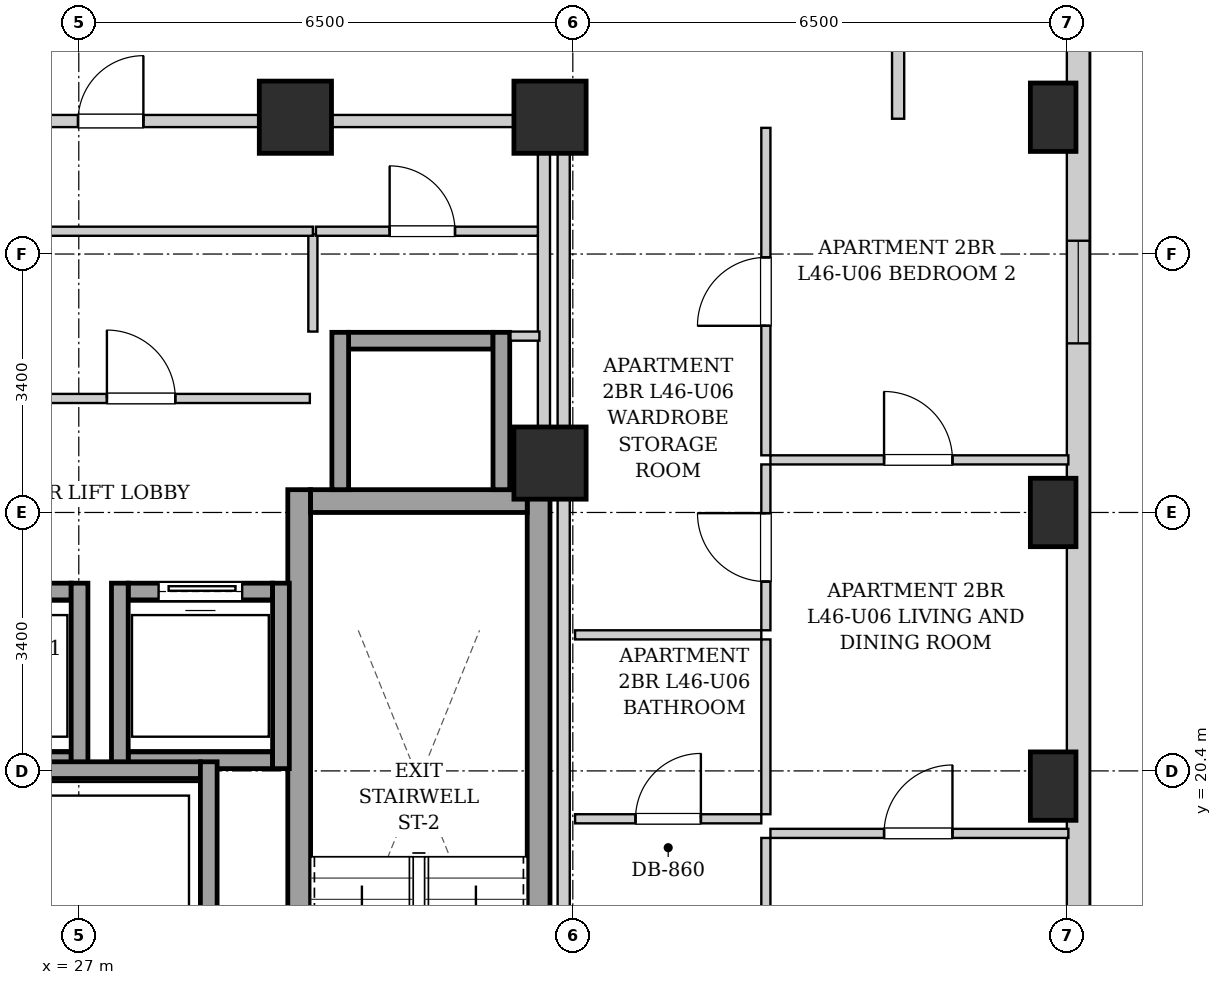
"""IFC4 building model, lengths in metres.
Left out: names, types, materials, properties, quantities, classifications, styles, units other than length and angle.
Written with IfcOpenShell. Run it as: python <this file> out.ifc"""

import sys

from ifc_helpers import new_model, si_unit, direction, frame, frame_2d, origin, origin_2d, place, context, subcontext, project, spatial, rectangle, extrude, element, fill, save


model = new_model("IFC4")
c1 = context("Model", 3, precision=1e-05, world=origin(), true_north=direction((0.0, 1.0)))
c2 = subcontext(c1, "Body", "Model", "MODEL_VIEW")
j1 = project(units=[si_unit("LENGTHUNIT", "METRE"), si_unit("PLANEANGLEUNIT", "RADIAN")], contexts=[c1])
p1 = place(None, origin())
s1 = spatial("IfcSite", under=j1, at=p1, CompositionType="ELEMENT")
p2 = place(p1, origin())
s2 = spatial("IfcBuilding", under=s1, at=p2, CompositionType="ELEMENT")
p3 = place(p2, frame((0.0, 0.0, 160.15)))
s3 = spatial("IfcBuildingStorey", under=s2, at=p3, CompositionType="ELEMENT", Elevation=160.15)
for number, where, z_axis, x_axis in (
    (1, (39.82, 20.2, 0.0), (0.0, 0.0, 1.0), (1.0, 0.0, 0.0)),
    (2, (39.82, 23.8, 0.0), (0.0, 0.0, 1.0), (1.0, 0.0, 0.0)),
    (3, (39.82, 29.0, 0.0), (0.0, 0.0, 1.0), (1.0, 0.0, 0.0)),
):
    element("IfcColumn", number, at=place(p3, frame(where, z_axis=z_axis, x_axis=x_axis)), inside=s3, PredefinedType="COLUMN", context=c2, shape_type="SweptSolid", body=[
        extrude(rectangle(XDim=0.6, YDim=0.9, at=origin_2d()), origin(), (0.0, 0.0, 1.0), 3.25),
    ])
for number, where, z_axis, x_axis in (
    (4, (29.85, 29.0, 0.0), (0.0, 0.0, 1.0), (1.0, 0.0, 0.0)),
    (5, (33.2, 29.0, 0.0), (0.0, 0.0, 1.0), (1.0, 0.0, 0.0)),
    (6, (33.2, 24.45, 0.0), (0.0, 0.0, 1.0), (1.0, 0.0, 0.0)),
):
    element("IfcColumn", number, at=place(p3, frame(where, z_axis=z_axis, x_axis=x_axis)), inside=s3, PredefinedType="COLUMN", context=c2, shape_type="SweptSolid", body=[
        extrude(rectangle(XDim=0.95, YDim=0.95, at=origin_2d()), origin(), (0.0, 0.0, 1.0), 3.25),
    ])
p4 = place(p3, frame((40.15, 40.8, 0.0), z_axis=(0.0, 0.0, 1.0), x_axis=(0.0, -1.0, 0.0)))
e7 = element("IfcWall", 7, at=p4, inside=s3, PredefinedType="SOLIDWALL", context=c2, shape_type="SweptSolid", body=[
    extrude(rectangle(XDim=34.5, YDim=0.3, at=frame_2d((17.25, 0.0))), origin(), (0.0, 0.0, 1.0), 2.99),
])
p5 = place(p4, frame((31.575, 0.0, 0.55)))
e8 = element("IfcOpeningElement", 8, at=p5, cuts=e7, PredefinedType="OPENING", context=c2, shape_type="SweptSolid", body=[
    extrude(rectangle(XDim=1.35, YDim=1.2, at=frame_2d((0.675, 0.6))), frame((0.0, 0.16, 0.0), z_axis=(0.0, -1.0, 0.0), x_axis=(1.0, 0.0, 0.0)), (0.0, 0.0, 1.0), 0.32),
])
p6 = place(p4, frame((3.075, 0.0, 0.55)))
e9 = element("IfcOpeningElement", 9, at=p6, cuts=e7, PredefinedType="OPENING", context=c2, shape_type="SweptSolid", body=[
    extrude(rectangle(XDim=1.35, YDim=1.2, at=frame_2d((0.675, 0.6))), frame((0.0, 0.16, 0.0), z_axis=(0.0, -1.0, 0.0), x_axis=(1.0, 0.0, 0.0)), (0.0, 0.0, 1.0), 0.32),
])
p7 = place(p4, frame((1.085, 0.0, 0.55)))
e10 = element("IfcOpeningElement", 10, at=p7, cuts=e7, PredefinedType="OPENING", context=c2, shape_type="SweptSolid", body=[
    extrude(rectangle(XDim=1.35, YDim=1.2, at=frame_2d((0.675, 0.6))), frame((0.0, 0.16, 0.0), z_axis=(0.0, -1.0, 0.0), x_axis=(1.0, 0.0, 0.0)), (0.0, 0.0, 1.0), 0.32),
])
p8 = place(p4, frame((22.8, 0.0, 0.55)))
e11 = element("IfcOpeningElement", 11, at=p8, cuts=e7, PredefinedType="OPENING", context=c2, shape_type="SweptSolid", body=[
    extrude(rectangle(XDim=1.35, YDim=1.2, at=frame_2d((0.675, 0.6))), frame((0.0, 0.16, 0.0), z_axis=(0.0, -1.0, 0.0), x_axis=(1.0, 0.0, 0.0)), (0.0, 0.0, 1.0), 0.32),
])
p9 = place(p4, frame((13.425, 0.0, 0.55)))
e12 = element("IfcOpeningElement", 12, at=p9, cuts=e7, PredefinedType="OPENING", context=c2, shape_type="SweptSolid", body=[
    extrude(rectangle(XDim=1.35, YDim=1.2, at=frame_2d((0.675, 0.6))), frame((0.0, 0.16, 0.0), z_axis=(0.0, -1.0, 0.0), x_axis=(1.0, 0.0, 0.0)), (0.0, 0.0, 1.0), 0.32),
])
for number, where, z_axis, x_axis in (
    (13, (29.9, 15.1, 0.0), (0.0, 0.0, 1.0), (0.0, 1.0, 0.0)),
    (14, (33.05, 15.1, 0.0), (0.0, 0.0, 1.0), (0.0, 1.0, 0.0)),
):
    element("IfcWall", number, at=place(p3, frame(where, z_axis=z_axis, x_axis=x_axis)), inside=s3, PredefinedType="SHEAR", context=c2, shape_type="SweptSolid", body=[
        extrude(rectangle(XDim=9.0, YDim=0.3, at=frame_2d((4.5, 0.0))), origin(), (0.0, 0.0, 1.0), 2.99),
    ])
p10 = place(p3, frame((30.05, 23.95, 0.0), z_axis=(0.0, 0.0, 1.0), x_axis=(1.0, 0.0, 0.0)))
e15 = element("IfcWall", 15, at=p10, inside=s3, PredefinedType="SHEAR", context=c2, shape_type="SweptSolid", body=[
    extrude(rectangle(XDim=2.85, YDim=0.3, at=frame_2d((1.425, 0.0))), origin(), (0.0, 0.0, 1.0), 2.99),
])
p11 = place(p3, frame((25.0, 20.54, 0.0), z_axis=(0.0, 0.0, 1.0), x_axis=(1.0, 0.0, 0.0)))
e16 = element("IfcWall", 16, at=p11, inside=s3, PredefinedType="SHEAR", context=c2, shape_type="SweptSolid", body=[
    extrude(rectangle(XDim=1.9, YDim=0.22, at=frame_2d((0.95, 0.0))), origin(), (0.0, 0.0, 1.0), 2.99),
])
p12 = place(p3, frame((25.0, 22.76, 0.0), z_axis=(0.0, 0.0, 1.0), x_axis=(1.0, 0.0, 0.0)))
e17 = element("IfcWall", 17, at=p12, inside=s3, PredefinedType="SHEAR", context=c2, shape_type="SweptSolid", body=[
    extrude(rectangle(XDim=1.9, YDim=0.22, at=frame_2d((0.95, 0.0))), origin(), (0.0, 0.0, 1.0), 2.99),
])
p13 = place(p12, frame((0.4, 0.0, 0.0)))
e18 = element("IfcOpeningElement", 18, at=p13, cuts=e17, PredefinedType="OPENING", context=c2, shape_type="SweptSolid", body=[
    extrude(rectangle(XDim=1.1, YDim=2.15, at=frame_2d((0.55, 1.075))), frame((0.0, 0.12, 0.0), z_axis=(0.0, -1.0, 0.0), x_axis=(1.0, 0.0, 0.0)), (0.0, 0.0, 1.0), 0.24),
])
p14 = place(p3, frame((27.01, 20.43, 0.0), z_axis=(0.0, 0.0, 1.0), x_axis=(0.0, 1.0, 0.0)))
e19 = element("IfcWall", 19, at=p14, inside=s3, PredefinedType="SHEAR", context=c2, shape_type="SweptSolid", body=[
    extrude(rectangle(XDim=2.44, YDim=0.22, at=frame_2d((1.22, 0.0))), origin(), (0.0, 0.0, 1.0), 2.99),
])
p15 = place(p3, frame((27.65, 20.54, 0.0), z_axis=(0.0, 0.0, 1.0), x_axis=(1.0, 0.0, 0.0)))
e20 = element("IfcWall", 20, at=p15, inside=s3, PredefinedType="SHEAR", context=c2, shape_type="SweptSolid", body=[
    extrude(rectangle(XDim=1.9, YDim=0.22, at=frame_2d((0.95, 0.0))), origin(), (0.0, 0.0, 1.0), 2.99),
])
p16 = place(p3, frame((27.65, 22.76, 0.0), z_axis=(0.0, 0.0, 1.0), x_axis=(1.0, 0.0, 0.0)))
e21 = element("IfcWall", 21, at=p16, inside=s3, PredefinedType="SHEAR", context=c2, shape_type="SweptSolid", body=[
    extrude(rectangle(XDim=1.9, YDim=0.22, at=frame_2d((0.95, 0.0))), origin(), (0.0, 0.0, 1.0), 2.99),
])
p17 = place(p16, frame((0.4, 0.0, 0.0)))
e22 = element("IfcOpeningElement", 22, at=p17, cuts=e21, PredefinedType="OPENING", context=c2, shape_type="SweptSolid", body=[
    extrude(rectangle(XDim=1.1, YDim=2.15, at=frame_2d((0.55, 1.075))), frame((0.0, 0.12, 0.0), z_axis=(0.0, -1.0, 0.0), x_axis=(1.0, 0.0, 0.0)), (0.0, 0.0, 1.0), 0.24),
])
for number, where, z_axis, x_axis in (
    (23, (27.54, 20.43, 0.0), (0.0, 0.0, 1.0), (0.0, 1.0, 0.0)),
    (24, (29.66, 20.43, 0.0), (0.0, 0.0, 1.0), (0.0, 1.0, 0.0)),
):
    element("IfcWall", number, at=place(p3, frame(where, z_axis=z_axis, x_axis=x_axis)), inside=s3, PredefinedType="SHEAR", context=c2, shape_type="SweptSolid", body=[
        extrude(rectangle(XDim=2.44, YDim=0.22, at=frame_2d((1.22, 0.0))), origin(), (0.0, 0.0, 1.0), 2.99),
    ])
p18 = place(p3, frame((30.55, 26.06, 0.0), z_axis=(0.0, 0.0, 1.0), x_axis=(1.0, 0.0, 0.0)))
e25 = element("IfcWall", 25, at=p18, inside=s3, PredefinedType="SHEAR", context=c2, shape_type="SweptSolid", body=[
    extrude(rectangle(XDim=1.9, YDim=0.22, at=frame_2d((0.95, 0.0))), origin(), (0.0, 0.0, 1.0), 2.99),
])
for number, where, z_axis, x_axis in (
    (26, (30.44, 24.1, 0.0), (0.0, 0.0, 1.0), (0.0, 1.0, 0.0)),
    (27, (32.56, 24.1, 0.0), (0.0, 0.0, 1.0), (0.0, 1.0, 0.0)),
):
    element("IfcWall", number, at=place(p3, frame(where, z_axis=z_axis, x_axis=x_axis)), inside=s3, PredefinedType="SHEAR", context=c2, shape_type="SweptSolid", body=[
        extrude(rectangle(XDim=2.07, YDim=0.22, at=frame_2d((1.035, 0.0))), origin(), (0.0, 0.0, 1.0), 2.99),
    ])
p19 = place(p3, frame((26.2, 20.41, 0.0), z_axis=(0.0, 0.0, 1.0), x_axis=(1.0, 0.0, 0.0)))
e28 = element("IfcWall", 28, at=p19, inside=s3, PredefinedType="SHEAR", context=c2, shape_type="SweptSolid", body=[
    extrude(rectangle(XDim=2.4, YDim=0.22, at=frame_2d((1.2, 0.0))), origin(), (0.0, 0.0, 1.0), 2.99),
])
p20 = place(p3, frame((28.71, 17.98, 0.0), z_axis=(0.0, 0.0, 1.0), x_axis=(0.0, 1.0, 0.0)))
e29 = element("IfcWall", 29, at=p20, inside=s3, PredefinedType="SHEAR", context=c2, shape_type="SweptSolid", body=[
    extrude(rectangle(XDim=2.54, YDim=0.22, at=frame_2d((1.27, 0.0))), origin(), (0.0, 0.0, 1.0), 2.99),
])
p21 = place(p3, frame((33.12, 24.12, 0.0), z_axis=(0.0, 0.0, 1.0), x_axis=(0.0, 1.0, 0.0)))
e30 = element("IfcWall", 30, at=p21, inside=s3, PredefinedType="PARTITIONING", context=c2, shape_type="SweptSolid", body=[
    extrude(rectangle(XDim=4.76, YDim=0.16, at=frame_2d((2.38, 0.0))), origin(), (0.0, 0.0, 1.0), 2.99),
])
p22 = place(p3, frame((30.08, 26.18, 0.0), z_axis=(0.0, 0.0, 1.0), x_axis=(0.0, 1.0, 0.0)))
e31 = element("IfcWall", 31, at=p22, inside=s3, PredefinedType="PARTITIONING", context=c2, shape_type="SweptSolid", body=[
    extrude(rectangle(XDim=1.28, YDim=0.12, at=frame_2d((0.64, 0.0))), origin(), (0.0, 0.0, 1.0), 2.99),
])
p23 = place(p3, frame((32.68, 26.12, 0.0), z_axis=(0.0, 0.0, 1.0), x_axis=(1.0, 0.0, 0.0)))
e32 = element("IfcWall", 32, at=p23, inside=s3, PredefinedType="PARTITIONING", context=c2, shape_type="SweptSolid", body=[
    extrude(rectangle(XDim=0.38, YDim=0.12, at=frame_2d((0.19, 0.0))), origin(), (0.0, 0.0, 1.0), 2.99),
])
p24 = place(p3, frame((30.12, 27.5, 0.0), z_axis=(0.0, 0.0, 1.0), x_axis=(1.0, 0.0, 0.0)))
e33 = element("IfcWall", 33, at=p24, inside=s3, PredefinedType="PARTITIONING", context=c2, shape_type="SweptSolid", body=[
    extrude(rectangle(XDim=2.92, YDim=0.12, at=frame_2d((1.46, 0.0))), origin(), (0.0, 0.0, 1.0), 2.99),
])
p25 = place(p24, frame((0.97, 0.0, 0.0)))
e34 = element("IfcOpeningElement", 34, at=p25, cuts=e33, PredefinedType="OPENING", context=c2, shape_type="SweptSolid", body=[
    extrude(rectangle(XDim=0.86, YDim=2.05, at=frame_2d((0.43, 1.025))), frame((0.0, 0.07, 0.0), z_axis=(0.0, -1.0, 0.0), x_axis=(1.0, 0.0, 0.0)), (0.0, 0.0, 1.0), 0.14),
])
p26 = place(p3, frame((25.72, 27.5, 0.0), z_axis=(0.0, 0.0, 1.0), x_axis=(1.0, 0.0, 0.0)))
e35 = element("IfcWall", 35, at=p26, inside=s3, PredefinedType="PARTITIONING", context=c2, shape_type="SweptSolid", body=[
    extrude(rectangle(XDim=4.36, YDim=0.12, at=frame_2d((2.18, 0.0))), origin(), (0.0, 0.0, 1.0), 2.99),
])
p27 = place(p3, frame((25.72, 25.3, 0.0), z_axis=(0.0, 0.0, 1.0), x_axis=(1.0, 0.0, 0.0)))
e36 = element("IfcWall", 36, at=p27, inside=s3, PredefinedType="PARTITIONING", context=c2, shape_type="SweptSolid", body=[
    extrude(rectangle(XDim=4.32, YDim=0.12, at=frame_2d((2.16, 0.0))), origin(), (0.0, 0.0, 1.0), 2.99),
])
p28 = place(p27, frame((1.65, 0.0, 0.0)))
e37 = element("IfcOpeningElement", 37, at=p28, cuts=e36, PredefinedType="OPENING", context=c2, shape_type="SweptSolid", body=[
    extrude(rectangle(XDim=0.9, YDim=2.05, at=frame_2d((0.45, 1.025))), frame((0.0, 0.07, 0.0), z_axis=(0.0, -1.0, 0.0), x_axis=(1.0, 0.0, 0.0)), (0.0, 0.0, 1.0), 0.14),
])
p29 = place(p3, frame((25.72, 28.95, 0.0), z_axis=(0.0, 0.0, 1.0), x_axis=(1.0, 0.0, 0.0)))
e38 = element("IfcWall", 38, at=p29, inside=s3, PredefinedType="PARTITIONING", context=c2, shape_type="SweptSolid", body=[
    extrude(rectangle(XDim=7.32, YDim=0.16, at=frame_2d((3.66, 0.0))), origin(), (0.0, 0.0, 1.0), 2.442),
])
p30 = place(p29, frame((1.27, 0.0, 0.0)))
e39 = element("IfcOpeningElement", 39, at=p30, cuts=e38, PredefinedType="OPENING", context=c2, shape_type="SweptSolid", body=[
    extrude(rectangle(XDim=0.86, YDim=2.05, at=frame_2d((0.43, 1.025))), frame((0.0, 0.09, 0.0), z_axis=(0.0, -1.0, 0.0), x_axis=(1.0, 0.0, 0.0)), (0.0, 0.0, 1.0), 0.18),
])
p31 = place(p3, frame((37.78, 28.98, 0.0), z_axis=(0.0, 0.0, 1.0), x_axis=(0.0, 1.0, 0.0)))
e40 = element("IfcWall", 40, at=p31, inside=s3, PredefinedType="PARTITIONING", context=c2, shape_type="SweptSolid", body=[
    extrude(rectangle(XDim=1.74, YDim=0.16, at=frame_2d((0.87, 0.0))), origin(), (0.0, 0.0, 1.0), 2.99),
])
p32 = place(p3, frame((33.53, 22.19, 0.0), z_axis=(0.0, 0.0, 1.0), x_axis=(1.0, 0.0, 0.0)))
e41 = element("IfcWall", 41, at=p32, inside=s3, PredefinedType="PARTITIONING", context=c2, shape_type="SweptSolid", body=[
    extrude(rectangle(XDim=2.45, YDim=0.12, at=frame_2d((1.225, 0.0))), origin(), (0.0, 0.0, 1.0), 2.99),
])
p33 = place(p3, frame((36.04, 22.25, 0.0), z_axis=(0.0, 0.0, 1.0), x_axis=(0.0, 1.0, 0.0)))
e42 = element("IfcWall", 42, at=p33, inside=s3, PredefinedType="PARTITIONING", context=c2, shape_type="SweptSolid", body=[
    extrude(rectangle(XDim=2.182, YDim=0.12, at=frame_2d((1.091, 0.0))), origin(), (0.0, 0.0, 1.0), 2.99),
])
p34 = place(p33, frame((0.641, 0.0, 0.0)))
e43 = element("IfcOpeningElement", 43, at=p34, cuts=e42, PredefinedType="OPENING", context=c2, shape_type="SweptSolid", body=[
    extrude(rectangle(XDim=0.9, YDim=2.05, at=frame_2d((0.45, 1.025))), frame((0.0, 0.07, 0.0), z_axis=(0.0, -1.0, 0.0), x_axis=(1.0, 0.0, 0.0)), (0.0, 0.0, 1.0), 0.14),
])
p35 = place(p3, frame((36.04, 24.552, 0.0), z_axis=(0.0, 0.0, 1.0), x_axis=(0.0, 1.0, 0.0)))
e44 = element("IfcWall", 44, at=p35, inside=s3, PredefinedType="PARTITIONING", context=c2, shape_type="SweptSolid", body=[
    extrude(rectangle(XDim=4.308, YDim=0.12, at=frame_2d((2.154, 0.0))), origin(), (0.0, 0.0, 1.0), 2.99),
])
p36 = place(p35, frame((1.704, 0.0, 0.0)))
e45 = element("IfcOpeningElement", 45, at=p36, cuts=e44, PredefinedType="OPENING", context=c2, shape_type="SweptSolid", body=[
    extrude(rectangle(XDim=0.9, YDim=2.05, at=frame_2d((0.45, 1.025))), frame((0.0, 0.07, 0.0), z_axis=(0.0, -1.0, 0.0), x_axis=(1.0, 0.0, 0.0)), (0.0, 0.0, 1.0), 0.14),
])
p37 = place(p3, frame((33.53, 19.77, 0.0), z_axis=(0.0, 0.0, 1.0), x_axis=(1.0, 0.0, 0.0)))
e46 = element("IfcWall", 46, at=p37, inside=s3, PredefinedType="PARTITIONING", context=c2, shape_type="SweptSolid", body=[
    extrude(rectangle(XDim=2.45, YDim=0.12, at=frame_2d((1.225, 0.0))), origin(), (0.0, 0.0, 1.0), 2.99),
])
p38 = place(p37, frame((0.795, 0.0, 0.0)))
e47 = element("IfcOpeningElement", 47, at=p38, cuts=e46, PredefinedType="OPENING", context=c2, shape_type="SweptSolid", body=[
    extrude(rectangle(XDim=0.86, YDim=2.05, at=frame_2d((0.43, 1.025))), frame((0.0, 0.07, 0.0), z_axis=(0.0, -1.0, 0.0), x_axis=(1.0, 0.0, 0.0)), (0.0, 0.0, 1.0), 0.14),
])
p39 = place(p3, frame((36.04, 19.83, 0.0), z_axis=(0.0, 0.0, 1.0), x_axis=(0.0, 1.0, 0.0)))
e48 = element("IfcWall", 48, at=p39, inside=s3, PredefinedType="PARTITIONING", context=c2, shape_type="SweptSolid", body=[
    extrude(rectangle(XDim=2.3, YDim=0.12, at=frame_2d((1.15, 0.0))), origin(), (0.0, 0.0, 1.0), 2.99),
])
p40 = place(p3, frame((36.04, 15.21, 0.0), z_axis=(0.0, 0.0, 1.0), x_axis=(0.0, 1.0, 0.0)))
e49 = element("IfcWall", 49, at=p40, inside=s3, PredefinedType="PARTITIONING", context=c2, shape_type="SweptSolid", body=[
    extrude(rectangle(XDim=4.308, YDim=0.12, at=frame_2d((2.154, 0.0))), origin(), (0.0, 0.0, 1.0), 2.99),
])
p41 = place(p40, frame((1.704, 0.0, 0.0)))
e50 = element("IfcOpeningElement", 50, at=p41, cuts=e49, PredefinedType="OPENING", context=c2, shape_type="SweptSolid", body=[
    extrude(rectangle(XDim=0.9, YDim=2.05, at=frame_2d((0.45, 1.025))), frame((0.0, 0.07, 0.0), z_axis=(0.0, -1.0, 0.0), x_axis=(1.0, 0.0, 0.0)), (0.0, 0.0, 1.0), 0.14),
])
p42 = place(p3, frame((36.1, 19.578, 0.0), z_axis=(0.0, 0.0, 1.0), x_axis=(1.0, 0.0, 0.0)))
e51 = element("IfcWall", 51, at=p42, inside=s3, PredefinedType="PARTITIONING", context=c2, shape_type="SweptSolid", body=[
    extrude(rectangle(XDim=3.92, YDim=0.12, at=frame_2d((1.96, 0.0))), origin(), (0.0, 0.0, 1.0), 2.99),
])
p43 = place(p42, frame((1.495, 0.0, 0.0)))
e52 = element("IfcOpeningElement", 52, at=p43, cuts=e51, PredefinedType="OPENING", context=c2, shape_type="SweptSolid", body=[
    extrude(rectangle(XDim=0.9, YDim=2.05, at=frame_2d((0.45, 1.025))), frame((0.0, 0.07, 0.0), z_axis=(0.0, -1.0, 0.0), x_axis=(1.0, 0.0, 0.0)), (0.0, 0.0, 1.0), 0.14),
])
p44 = place(p3, frame((36.1, 24.492, 0.0), z_axis=(0.0, 0.0, 1.0), x_axis=(1.0, 0.0, 0.0)))
e53 = element("IfcWall", 53, at=p44, inside=s3, PredefinedType="PARTITIONING", context=c2, shape_type="SweptSolid", body=[
    extrude(rectangle(XDim=3.92, YDim=0.12, at=frame_2d((1.96, 0.0))), origin(), (0.0, 0.0, 1.0), 2.621),
])
p45 = place(p44, frame((1.495, 0.0, 0.0)))
e54 = element("IfcOpeningElement", 54, at=p45, cuts=e53, PredefinedType="OPENING", context=c2, shape_type="SweptSolid", body=[
    extrude(rectangle(XDim=0.9, YDim=2.05, at=frame_2d((0.45, 1.025))), frame((0.0, 0.07, 0.0), z_axis=(0.0, -1.0, 0.0), x_axis=(1.0, 0.0, 0.0)), (0.0, 0.0, 1.0), 0.14),
])
p46 = place(p3, frame((33.38, 15.02, 0.0), z_axis=(0.0, 0.0, 1.0), x_axis=(0.0, 1.0, 0.0)))
e55 = element("IfcWall", 55, at=p46, inside=s3, PredefinedType="PARTITIONING", context=c2, shape_type="SweptSolid", body=[
    extrude(rectangle(XDim=13.98, YDim=0.16, at=frame_2d((6.99, 0.0))), origin(), (0.0, 0.0, 1.0), 2.99),
])
p47 = place(p17, origin())
e56 = element("IfcDoor", 56, at=p47, inside=s3, OperationType="SLIDING_TO_LEFT", PredefinedType="DOOR", context=c2, shape_type="SweptSolid", body=[
    extrude(rectangle(XDim=1.1, YDim=2.15, at=frame_2d((0.55, 1.075))), frame((0.0, 0.025, 0.0), z_axis=(0.0, -1.0, 0.0), x_axis=(1.0, 0.0, 0.0)), (0.0, 0.0, 1.0), 0.05),
])
fill(e22, e56)
p48 = place(p25, origin())
e57 = element("IfcDoor", 57, at=p48, inside=s3, OperationType="SINGLE_SWING_LEFT", PredefinedType="DOOR", context=c2, shape_type="SweptSolid", body=[
    extrude(rectangle(XDim=0.86, YDim=2.05, at=frame_2d((0.43, 1.025))), frame((0.0, 0.025, 0.0), z_axis=(0.0, -1.0, 0.0), x_axis=(1.0, 0.0, 0.0)), (0.0, 0.0, 1.0), 0.05),
])
fill(e34, e57)
p49 = place(p28, origin())
e58 = element("IfcDoor", 58, at=p49, inside=s3, OperationType="SINGLE_SWING_LEFT", PredefinedType="DOOR", context=c2, shape_type="SweptSolid", body=[
    extrude(rectangle(XDim=0.9, YDim=2.05, at=frame_2d((0.45, 1.025))), frame((0.0, 0.025, 0.0), z_axis=(0.0, -1.0, 0.0), x_axis=(1.0, 0.0, 0.0)), (0.0, 0.0, 1.0), 0.05),
])
fill(e37, e58)
p50 = place(p30, origin())
e59 = element("IfcDoor", 59, at=p50, inside=s3, OperationType="SINGLE_SWING_RIGHT", PredefinedType="DOOR", context=c2, shape_type="SweptSolid", body=[
    extrude(rectangle(XDim=0.86, YDim=2.05, at=frame_2d((0.43, 1.025))), frame((0.0, 0.025, 0.0), z_axis=(0.0, -1.0, 0.0), x_axis=(1.0, 0.0, 0.0)), (0.0, 0.0, 1.0), 0.05),
])
fill(e39, e59)
p51 = place(p34, origin())
e60 = element("IfcDoor", 60, at=p51, inside=s3, OperationType="SINGLE_SWING_RIGHT", PredefinedType="DOOR", context=c2, shape_type="SweptSolid", body=[
    extrude(rectangle(XDim=0.9, YDim=2.05, at=frame_2d((0.45, 1.025))), frame((0.0, 0.025, 0.0), z_axis=(0.0, -1.0, 0.0), x_axis=(1.0, 0.0, 0.0)), (0.0, 0.0, 1.0), 0.05),
])
fill(e43, e60)
p52 = place(p36, origin())
e61 = element("IfcDoor", 61, at=p52, inside=s3, OperationType="SINGLE_SWING_LEFT", PredefinedType="DOOR", context=c2, shape_type="SweptSolid", body=[
    extrude(rectangle(XDim=0.9, YDim=2.05, at=frame_2d((0.45, 1.025))), frame((0.0, 0.025, 0.0), z_axis=(0.0, -1.0, 0.0), x_axis=(1.0, 0.0, 0.0)), (0.0, 0.0, 1.0), 0.05),
])
fill(e45, e61)
p53 = place(p38, origin())
e62 = element("IfcDoor", 62, at=p53, inside=s3, OperationType="SINGLE_SWING_RIGHT", PredefinedType="DOOR", context=c2, shape_type="SweptSolid", body=[
    extrude(rectangle(XDim=0.86, YDim=2.05, at=frame_2d((0.43, 1.025))), frame((0.0, 0.025, 0.0), z_axis=(0.0, -1.0, 0.0), x_axis=(1.0, 0.0, 0.0)), (0.0, 0.0, 1.0), 0.05),
])
fill(e47, e62)
p54 = place(p43, origin())
e63 = element("IfcDoor", 63, at=p54, inside=s3, OperationType="SINGLE_SWING_RIGHT", PredefinedType="DOOR", context=c2, shape_type="SweptSolid", body=[
    extrude(rectangle(XDim=0.9, YDim=2.05, at=frame_2d((0.45, 1.025))), frame((0.0, 0.025, 0.0), z_axis=(0.0, -1.0, 0.0), x_axis=(1.0, 0.0, 0.0)), (0.0, 0.0, 1.0), 0.05),
])
fill(e52, e63)
p55 = place(p45, origin())
e64 = element("IfcDoor", 64, at=p55, inside=s3, OperationType="SINGLE_SWING_LEFT", PredefinedType="DOOR", context=c2, shape_type="SweptSolid", body=[
    extrude(rectangle(XDim=0.9, YDim=2.05, at=frame_2d((0.45, 1.025))), frame((0.0, 0.025, 0.0), z_axis=(0.0, -1.0, 0.0), x_axis=(1.0, 0.0, 0.0)), (0.0, 0.0, 1.0), 0.05),
])
fill(e54, e64)
p56 = place(p9, origin())
e65 = element("IfcWindow", 65, at=p56, inside=s3, PartitioningType="SINGLE_PANEL", PredefinedType="WINDOW", context=c2, shape_type="SweptSolid", body=[
    extrude(rectangle(XDim=1.35, YDim=1.2, at=frame_2d((0.675, 0.6))), frame((0.0, 0.03, 0.0), z_axis=(0.0, -1.0, 0.0), x_axis=(1.0, 0.0, 0.0)), (0.0, 0.0, 1.0), 0.06),
])
fill(e12, e65)
save(model, sys.argv[1])
